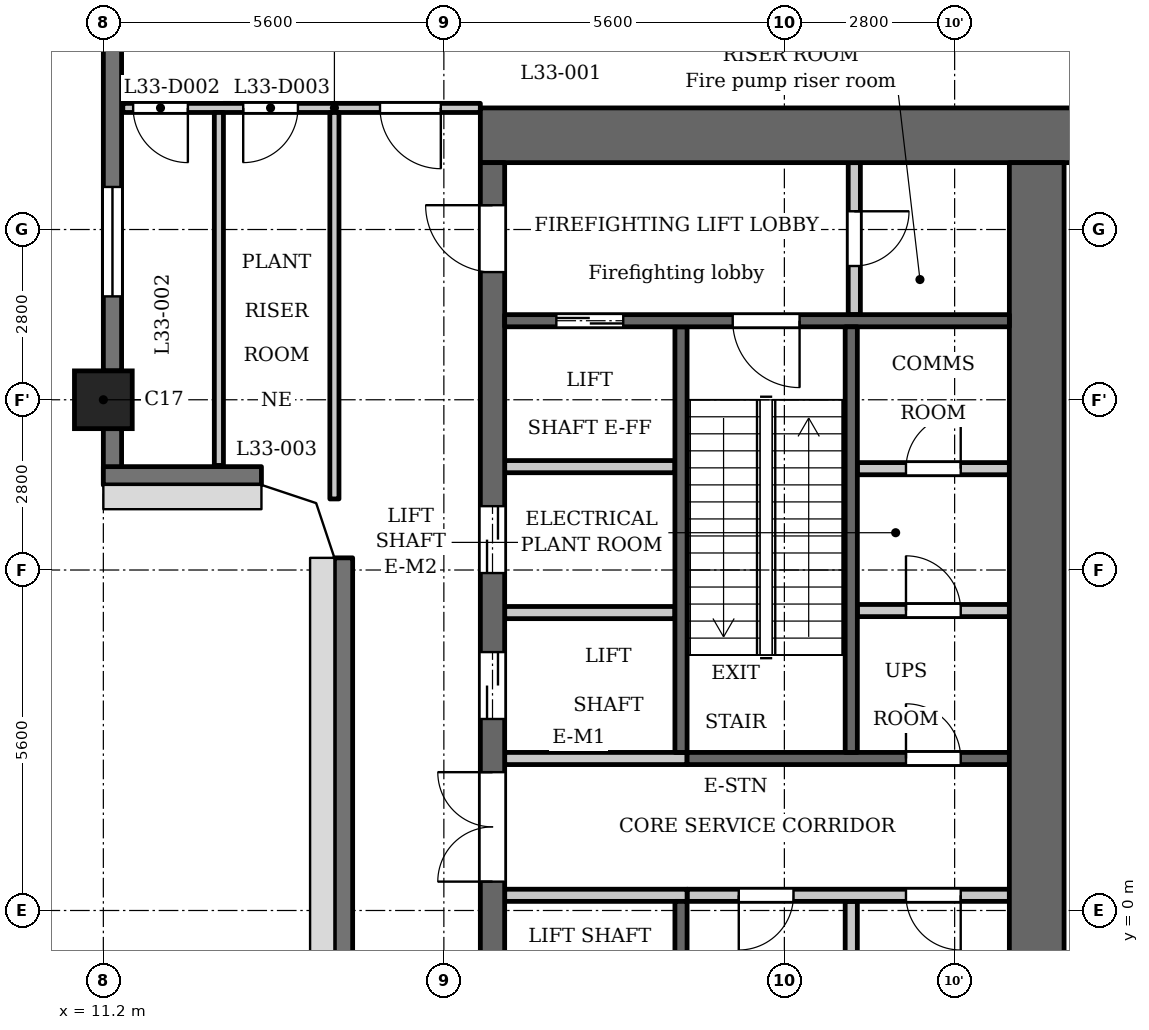
"""IFC4 building model, lengths in metres.
Left out: names, types, materials, properties, quantities, classifications, styles, units other than length and angle.
Written with IfcOpenShell. Run it as: python <this file> out.ifc"""

import sys

from ifc_helpers import new_model, si_unit, direction, frame, frame_2d, origin, origin_2d, place, context, subcontext, project, spatial, polyline, rectangle, outline, extrude, element, fill, save


model = new_model("IFC4")
c1 = context("Model", 3, precision=1e-05, world=origin(), true_north=direction((0.0, 1.0)))
c2 = subcontext(c1, "Body", "Model", "MODEL_VIEW")
j1 = project(units=[si_unit("LENGTHUNIT", "METRE"), si_unit("PLANEANGLEUNIT", "RADIAN")], contexts=[c1])
p1 = place(None, origin())
s1 = spatial("IfcSite", under=j1, at=p1, CompositionType="ELEMENT")
p2 = place(p1, origin())
s2 = spatial("IfcBuilding", under=s1, at=p2, CompositionType="ELEMENT")
p3 = place(p2, frame((0.0, 0.0, 130.7)))
s3 = spatial("IfcBuildingStorey", under=s2, at=p3, CompositionType="ELEMENT", Elevation=130.7)
p4 = place(p3, frame((11.2, 8.4, 0.0), z_axis=(0.0, 0.0, 1.0), x_axis=(1.0, 0.0, 0.0)))
e1 = element("IfcColumn", 1, at=p4, inside=s3, PredefinedType="COLUMN", context=c2, shape_type="SweptSolid", body=[
    extrude(rectangle(XDim=0.95, YDim=0.95, at=origin_2d()), origin(), (0.0, 0.0, 1.0), 5.4),
])
p5 = place(p3, frame((11.35, 14.975, 0.0), z_axis=(0.0, 0.0, 1.0), x_axis=(0.0, -1.0, 0.0)))
e2 = element("IfcWall", 2, at=p5, inside=s3, PredefinedType="SOLIDWALL", context=c2, shape_type="SweptSolid", body=[
    extrude(rectangle(XDim=6.1, YDim=0.3, at=frame_2d((3.05, 0.0))), origin(), (0.0, 0.0, 1.0), 5.1),
])
p6 = place(p5, frame((3.075, 0.0, 0.9)))
e3 = element("IfcOpeningElement", 3, at=p6, cuts=e2, PredefinedType="OPENING", context=c2, shape_type="SweptSolid", body=[
    extrude(rectangle(XDim=1.8, YDim=1.5, at=frame_2d((0.9, 0.75))), frame((0.0, 0.16, 0.0), z_axis=(0.0, -1.0, 0.0), x_axis=(1.0, 0.0, 0.0)), (0.0, 0.0, 1.0), 0.32),
])
p7 = place(p3, frame((11.35, 7.925, 0.0), z_axis=(0.0, 0.0, 1.0), x_axis=(0.0, -1.0, 0.0)))
e4 = element("IfcWall", 4, at=p7, inside=s3, PredefinedType="SOLIDWALL", context=c2, shape_type="SweptSolid", body=[
    extrude(rectangle(XDim=0.925, YDim=0.3, at=frame_2d((0.462, 0.0))), origin(), (0.0, 0.0, 1.0), 5.1),
])
p8 = place(p3, frame((11.2, 7.15, 0.0), z_axis=(0.0, 0.0, 1.0), x_axis=(1.0, 0.0, 0.0)))
e5 = element("IfcWall", 5, at=p8, inside=s3, PredefinedType="SOLIDWALL", context=c2, shape_type="SweptSolid", body=[
    extrude(rectangle(XDim=2.6, YDim=0.3, at=frame_2d((1.3, 0.0))), origin(), (0.0, 0.0, 1.0), 5.1),
])
p9 = place(p3, frame((15.15, 5.8, 0.0), z_axis=(0.0, 0.0, 1.0), x_axis=(0.0, -1.0, 0.0)))
e6 = element("IfcWall", 6, at=p9, inside=s3, PredefinedType="SOLIDWALL", context=c2, shape_type="SweptSolid", body=[
    extrude(rectangle(XDim=11.6, YDim=0.3, at=frame_2d((5.8, 0.0))), origin(), (0.0, 0.0, 1.0), 5.1),
])
p10 = place(p3, frame((23.5, -2.5, 0.0), z_axis=(0.0, 0.0, 1.0), x_axis=(0.0, 1.0, 0.0)))
e7 = element("IfcWall", 7, at=p10, inside=s3, PredefinedType="PARTITIONING", context=c2, shape_type="SweptSolid", body=[
    extrude(rectangle(XDim=2.65, YDim=0.2, at=frame_2d((1.325, 0.0))), origin(), (0.0, 0.0, 1.0), 5.1),
])
p11 = place(p3, frame((20.7, 2.6, 0.0), z_axis=(0.0, 0.0, 1.0), x_axis=(0.0, 1.0, 0.0)))
e8 = element("IfcWall", 8, at=p11, inside=s3, PredefinedType="SHEAR", context=c2, shape_type="SweptSolid", body=[
    extrude(rectangle(XDim=7.0, YDim=0.2, at=frame_2d((3.5, 0.0))), origin(), (0.0, 0.0, 1.0), 5.1),
])
p12 = place(p3, frame((20.7, -9.6, 0.0), z_axis=(0.0, 0.0, 1.0), x_axis=(0.0, 1.0, 0.0)))
e9 = element("IfcWall", 9, at=p12, inside=s3, PredefinedType="SHEAR", context=c2, shape_type="SweptSolid", body=[
    extrude(rectangle(XDim=9.75, YDim=0.2, at=frame_2d((4.875, 0.0))), origin(), (0.0, 0.0, 1.0), 5.1),
])
p13 = place(p3, frame((20.8, 2.5, 0.0), z_axis=(0.0, 0.0, 1.0), x_axis=(1.0, 0.0, 0.0)))
e10 = element("IfcWall", 10, at=p13, inside=s3, PredefinedType="SHEAR", context=c2, shape_type="SweptSolid", body=[
    extrude(rectangle(XDim=5.3, YDim=0.2, at=frame_2d((2.65, 0.0))), origin(), (0.0, 0.0, 1.0), 5.1),
])
p14 = place(p13, frame((3.6, 0.0, 0.0)))
e11 = element("IfcOpeningElement", 11, at=p14, cuts=e10, PredefinedType="OPENING", context=c2, shape_type="SweptSolid", body=[
    extrude(rectangle(XDim=0.9, YDim=2.1, at=frame_2d((0.45, 1.05))), frame((0.0, 0.11, 0.0), z_axis=(0.0, -1.0, 0.0), x_axis=(1.0, 0.0, 0.0)), (0.0, 0.0, 1.0), 0.22),
])
p15 = place(p3, frame((20.8, 0.25, 0.0), z_axis=(0.0, 0.0, 1.0), x_axis=(1.0, 0.0, 0.0)))
e12 = element("IfcWall", 12, at=p15, inside=s3, PredefinedType="PARTITIONING", context=c2, shape_type="SweptSolid", body=[
    extrude(rectangle(XDim=5.3, YDim=0.2, at=frame_2d((2.65, 0.0))), origin(), (0.0, 0.0, 1.0), 5.1),
])
p16 = place(p15, frame((0.85, 0.0, 0.0)))
e13 = element("IfcOpeningElement", 13, at=p16, cuts=e12, PredefinedType="OPENING", context=c2, shape_type="SweptSolid", body=[
    extrude(rectangle(XDim=0.9, YDim=2.1, at=frame_2d((0.45, 1.05))), frame((0.0, 0.11, 0.0), z_axis=(0.0, -1.0, 0.0), x_axis=(1.0, 0.0, 0.0)), (0.0, 0.0, 1.0), 0.22),
])
p17 = place(p15, frame((3.6, 0.0, 0.0)))
e14 = element("IfcOpeningElement", 14, at=p17, cuts=e12, PredefinedType="OPENING", context=c2, shape_type="SweptSolid", body=[
    extrude(rectangle(XDim=0.9, YDim=2.1, at=frame_2d((0.45, 1.05))), frame((0.0, 0.11, 0.0), z_axis=(0.0, -1.0, 0.0), x_axis=(1.0, 0.0, 0.0)), (0.0, 0.0, 1.0), 0.22),
])
p18 = place(p3, frame((17.4, 12.75, 0.0), z_axis=(0.0, 0.0, 1.0), x_axis=(1.0, 0.0, 0.0)))
e15 = element("IfcWall", 15, at=p18, inside=s3, PredefinedType="SHEAR", context=c2, shape_type="SweptSolid", body=[
    extrude(rectangle(XDim=10.4, YDim=0.9, at=frame_2d((5.2, 0.0))), origin(), (0.0, 0.0, 1.0), 5.1),
])
p19 = place(p3, frame((17.6, -12.3, 0.0), z_axis=(0.0, 0.0, 1.0), x_axis=(0.0, 1.0, 0.0)))
e16 = element("IfcWall", 16, at=p19, inside=s3, PredefinedType="SHEAR", context=c2, shape_type="SweptSolid", body=[
    extrude(rectangle(XDim=24.6, YDim=0.4, at=frame_2d((12.3, 0.0))), origin(), (0.0, 0.0, 1.0), 5.1),
])
p20 = place(p19, frame((15.45, 0.0, 0.0)))
e17 = element("IfcOpeningElement", 17, at=p20, cuts=e16, PredefinedType="OPENING", context=c2, shape_type="SweptSolid", body=[
    extrude(rectangle(XDim=1.1, YDim=2.1, at=frame_2d((0.55, 1.05))), frame((0.0, 0.21, 0.0), z_axis=(0.0, -1.0, 0.0), x_axis=(1.0, 0.0, 0.0)), (0.0, 0.0, 1.0), 0.42),
])
p21 = place(p19, frame((17.85, 0.0, 0.0)))
e18 = element("IfcOpeningElement", 18, at=p21, cuts=e16, PredefinedType="OPENING", context=c2, shape_type="SweptSolid", body=[
    extrude(rectangle(XDim=1.1, YDim=2.1, at=frame_2d((0.55, 1.05))), frame((0.0, 0.21, 0.0), z_axis=(0.0, -1.0, 0.0), x_axis=(1.0, 0.0, 0.0)), (0.0, 0.0, 1.0), 0.42),
])
p22 = place(p19, frame((22.8, 0.0, 0.0)))
e19 = element("IfcOpeningElement", 19, at=p22, cuts=e16, PredefinedType="OPENING", context=c2, shape_type="SweptSolid", body=[
    extrude(rectangle(XDim=1.1, YDim=2.1, at=frame_2d((0.55, 1.05))), frame((0.0, 0.21, 0.0), z_axis=(0.0, -1.0, 0.0), x_axis=(1.0, 0.0, 0.0)), (0.0, 0.0, 1.0), 0.42),
])
p23 = place(p19, frame((0.7, 0.0, 0.0)))
e20 = element("IfcOpeningElement", 20, at=p23, cuts=e16, PredefinedType="OPENING", context=c2, shape_type="SweptSolid", body=[
    extrude(rectangle(XDim=1.1, YDim=2.1, at=frame_2d((0.55, 1.05))), frame((0.0, 0.21, 0.0), z_axis=(0.0, -1.0, 0.0), x_axis=(1.0, 0.0, 0.0)), (0.0, 0.0, 1.0), 0.42),
])
p24 = place(p19, frame((12.775, 0.0, 0.0)))
e21 = element("IfcOpeningElement", 21, at=p24, cuts=e16, PredefinedType="OPENING", context=c2, shape_type="SweptSolid", body=[
    extrude(rectangle(XDim=1.8, YDim=2.1, at=frame_2d((0.9, 1.05))), frame((0.0, 0.21, 0.0), z_axis=(0.0, -1.0, 0.0), x_axis=(1.0, 0.0, 0.0)), (0.0, 0.0, 1.0), 0.42),
])
p25 = place(p3, frame((26.55, -12.3, 0.0), z_axis=(0.0, 0.0, 1.0), x_axis=(0.0, 1.0, 0.0)))
e22 = element("IfcWall", 22, at=p25, inside=s3, PredefinedType="SHEAR", context=c2, shape_type="SweptSolid", body=[
    extrude(rectangle(XDim=24.6, YDim=0.9, at=frame_2d((12.3, 0.0))), origin(), (0.0, 0.0, 1.0), 5.1),
])
p26 = place(p3, frame((23.55, 9.8, 0.0), z_axis=(0.0, 0.0, 1.0), x_axis=(0.0, 1.0, 0.0)))
e23 = element("IfcWall", 23, at=p26, inside=s3, PredefinedType="PARTITIONING", context=c2, shape_type="SweptSolid", body=[
    extrude(rectangle(XDim=2.5, YDim=0.2, at=frame_2d((1.25, 0.0))), origin(), (0.0, 0.0, 1.0), 5.1),
])
p27 = place(p26, frame((0.8, 0.0, 0.0)))
e24 = element("IfcOpeningElement", 24, at=p27, cuts=e23, PredefinedType="OPENING", context=c2, shape_type="SweptSolid", body=[
    extrude(rectangle(XDim=0.9, YDim=2.1, at=frame_2d((0.45, 1.05))), frame((0.0, 0.11, 0.0), z_axis=(0.0, -1.0, 0.0), x_axis=(1.0, 0.0, 0.0)), (0.0, 0.0, 1.0), 0.22),
])
p28 = place(p3, frame((23.6, 4.933, 0.0), z_axis=(0.0, 0.0, 1.0), x_axis=(1.0, 0.0, 0.0)))
e25 = element("IfcWall", 25, at=p28, inside=s3, PredefinedType="PARTITIONING", context=c2, shape_type="SweptSolid", body=[
    extrude(rectangle(XDim=2.5, YDim=0.2, at=frame_2d((1.25, 0.0))), origin(), (0.0, 0.0, 1.0), 5.1),
])
p29 = place(p28, frame((0.8, 0.0, 0.0)))
e26 = element("IfcOpeningElement", 26, at=p29, cuts=e25, PredefinedType="OPENING", context=c2, shape_type="SweptSolid", body=[
    extrude(rectangle(XDim=0.9, YDim=2.1, at=frame_2d((0.45, 1.05))), frame((0.0, 0.11, 0.0), z_axis=(0.0, -1.0, 0.0), x_axis=(1.0, 0.0, 0.0)), (0.0, 0.0, 1.0), 0.22),
])
p30 = place(p3, frame((23.6, 7.267, 0.0), z_axis=(0.0, 0.0, 1.0), x_axis=(1.0, 0.0, 0.0)))
e27 = element("IfcWall", 27, at=p30, inside=s3, PredefinedType="PARTITIONING", context=c2, shape_type="SweptSolid", body=[
    extrude(rectangle(XDim=2.5, YDim=0.2, at=frame_2d((1.25, 0.0))), origin(), (0.0, 0.0, 1.0), 5.1),
])
p31 = place(p30, frame((0.8, 0.0, 0.0)))
e28 = element("IfcOpeningElement", 28, at=p31, cuts=e27, PredefinedType="OPENING", context=c2, shape_type="SweptSolid", body=[
    extrude(rectangle(XDim=0.9, YDim=2.1, at=frame_2d((0.45, 1.05))), frame((0.0, 0.11, 0.0), z_axis=(0.0, -1.0, 0.0), x_axis=(1.0, 0.0, 0.0)), (0.0, 0.0, 1.0), 0.22),
])
for number, where, z_axis, x_axis in (
    (29, (17.8, 0.25, 0.0), (0.0, 0.0, 1.0), (1.0, 0.0, 0.0)),
    (30, (17.8, 2.5, 0.0), (0.0, 0.0, 1.0), (1.0, 0.0, 0.0)),
):
    element("IfcWall", number, at=place(p3, frame(where, z_axis=z_axis, x_axis=x_axis)), inside=s3, PredefinedType="PARTITIONING", context=c2, shape_type="SweptSolid", body=[
        extrude(rectangle(XDim=3.0, YDim=0.2, at=frame_2d((1.5, 0.0))), origin(), (0.0, 0.0, 1.0), 5.1),
    ])
for number, where, z_axis, x_axis in (
    (31, (17.8, 4.9, 0.0), (0.0, 0.0, 1.0), (1.0, 0.0, 0.0)),
    (32, (17.8, 7.3, 0.0), (0.0, 0.0, 1.0), (1.0, 0.0, 0.0)),
):
    element("IfcWall", number, at=place(p3, frame(where, z_axis=z_axis, x_axis=x_axis)), inside=s3, PredefinedType="PARTITIONING", context=c2, shape_type="SweptSolid", body=[
        extrude(rectangle(XDim=2.8, YDim=0.2, at=frame_2d((1.4, 0.0))), origin(), (0.0, 0.0, 1.0), 5.1),
    ])
p32 = place(p3, frame((17.8, 9.7, 0.0), z_axis=(0.0, 0.0, 1.0), x_axis=(1.0, 0.0, 0.0)))
e33 = element("IfcWall", 33, at=p32, inside=s3, PredefinedType="SHEAR", context=c2, shape_type="SweptSolid", body=[
    extrude(rectangle(XDim=8.3, YDim=0.2, at=frame_2d((4.15, 0.0))), origin(), (0.0, 0.0, 1.0), 5.1),
])
p33 = place(p32, frame((0.85, 0.0, 0.0)))
e34 = element("IfcOpeningElement", 34, at=p33, cuts=e33, PredefinedType="OPENING", context=c2, shape_type="SweptSolid", body=[
    extrude(rectangle(XDim=1.1, YDim=2.1, at=frame_2d((0.55, 1.05))), frame((0.0, 0.11, 0.0), z_axis=(0.0, -1.0, 0.0), x_axis=(1.0, 0.0, 0.0)), (0.0, 0.0, 1.0), 0.22),
])
p34 = place(p32, frame((3.75, 0.0, 0.0)))
e35 = element("IfcOpeningElement", 35, at=p34, cuts=e33, PredefinedType="OPENING", context=c2, shape_type="SweptSolid", body=[
    extrude(rectangle(XDim=1.1, YDim=2.1, at=frame_2d((0.55, 1.05))), frame((0.0, 0.11, 0.0), z_axis=(0.0, -1.0, 0.0), x_axis=(1.0, 0.0, 0.0)), (0.0, 0.0, 1.0), 0.22),
])
p35 = place(p3, frame((23.5, 2.6, 0.0), z_axis=(0.0, 0.0, 1.0), x_axis=(0.0, 1.0, 0.0)))
e36 = element("IfcWall", 36, at=p35, inside=s3, PredefinedType="SHEAR", context=c2, shape_type="SweptSolid", body=[
    extrude(rectangle(XDim=7.0, YDim=0.2, at=frame_2d((3.5, 0.0))), origin(), (0.0, 0.0, 1.0), 5.1),
])
p36 = place(p3, frame((11.52, 13.2, 0.0), z_axis=(0.0, 0.0, 1.0), x_axis=(1.0, 0.0, 0.0)))
e37 = element("IfcWall", 37, at=p36, inside=s3, PredefinedType="PARTITIONING", context=c2, shape_type="SweptSolid", body=[
    extrude(rectangle(XDim=5.88, YDim=0.15, at=frame_2d((2.94, 0.0))), origin(), (0.0, 0.0, 1.0), 5.1),
])
p37 = place(p36, frame((4.23, 0.0, 0.0)))
e38 = element("IfcOpeningElement", 38, at=p37, cuts=e37, PredefinedType="OPENING", context=c2, shape_type="SweptSolid", body=[
    extrude(rectangle(XDim=1.0, YDim=2.1, at=frame_2d((0.5, 1.05))), frame((0.0, 0.085, 0.0), z_axis=(0.0, -1.0, 0.0), x_axis=(1.0, 0.0, 0.0)), (0.0, 0.0, 1.0), 0.17),
])
p38 = place(p36, frame((0.17, 0.0, 0.0)))
e39 = element("IfcOpeningElement", 39, at=p38, cuts=e37, PredefinedType="OPENING", context=c2, shape_type="SweptSolid", body=[
    extrude(rectangle(XDim=0.9, YDim=2.1, at=frame_2d((0.45, 1.05))), frame((0.0, 0.085, 0.0), z_axis=(0.0, -1.0, 0.0), x_axis=(1.0, 0.0, 0.0)), (0.0, 0.0, 1.0), 0.17),
])
p39 = place(p36, frame((1.98, 0.0, 0.0)))
e40 = element("IfcOpeningElement", 40, at=p39, cuts=e37, PredefinedType="OPENING", context=c2, shape_type="SweptSolid", body=[
    extrude(rectangle(XDim=0.9, YDim=2.1, at=frame_2d((0.45, 1.05))), frame((0.0, 0.085, 0.0), z_axis=(0.0, -1.0, 0.0), x_axis=(1.0, 0.0, 0.0)), (0.0, 0.0, 1.0), 0.17),
])
p40 = place(p3, frame((13.1, 7.32, 0.0), z_axis=(0.0, 0.0, 1.0), x_axis=(0.0, 1.0, 0.0)))
e41 = element("IfcWall", 41, at=p40, inside=s3, PredefinedType="PARTITIONING", context=c2, shape_type="SweptSolid", body=[
    extrude(rectangle(XDim=5.805, YDim=0.15, at=frame_2d((2.902, 0.0))), origin(), (0.0, 0.0, 1.0), 5.1),
])
p41 = place(p3, frame((15.0, 6.769, 0.0), z_axis=(0.0, 0.0, 1.0), x_axis=(0.0, 1.0, 0.0)))
e42 = element("IfcWall", 42, at=p41, inside=s3, PredefinedType="PARTITIONING", context=c2, shape_type="SweptSolid", body=[
    extrude(rectangle(XDim=6.356, YDim=0.15, at=frame_2d((3.178, 0.0))), origin(), (0.0, 0.0, 1.0), 5.1),
])
p42 = place(p3, origin())
e43 = element("IfcWall", 43, at=p42, inside=s3, PredefinedType="SOLIDWALL", context=c2, shape_type="SweptSolid", body=[
    extrude(outline(polyline([(13.8, 7.0), (14.7, 6.7), (15.0, 5.8), (15.3, 5.8), (15.3, 5.849), (14.937, 6.937), (13.849, 7.3), (13.8, 7.3), (13.8, 7.0)])), origin(), (0.0, 0.0, 1.0), 5.1),
])
p43 = place(p20, origin())
e44 = element("IfcDoor", 44, at=p43, inside=s3, OperationType="DOUBLE_DOOR_SLIDING", PredefinedType="DOOR", context=c2, shape_type="SweptSolid", body=[
    extrude(rectangle(XDim=1.1, YDim=2.1, at=frame_2d((0.55, 1.05))), frame((0.0, 0.025, 0.0), z_axis=(0.0, -1.0, 0.0), x_axis=(1.0, 0.0, 0.0)), (0.0, 0.0, 1.0), 0.05),
])
fill(e17, e44)
p44 = place(p21, origin())
e45 = element("IfcDoor", 45, at=p44, inside=s3, OperationType="DOUBLE_DOOR_SLIDING", PredefinedType="DOOR", context=c2, shape_type="SweptSolid", body=[
    extrude(rectangle(XDim=1.1, YDim=2.1, at=frame_2d((0.55, 1.05))), frame((0.0, 0.025, 0.0), z_axis=(0.0, -1.0, 0.0), x_axis=(1.0, 0.0, 0.0)), (0.0, 0.0, 1.0), 0.05),
])
fill(e18, e45)
p45 = place(p33, origin())
e46 = element("IfcDoor", 46, at=p45, inside=s3, OperationType="DOUBLE_DOOR_SLIDING", PredefinedType="DOOR", context=c2, shape_type="SweptSolid", body=[
    extrude(rectangle(XDim=1.1, YDim=2.1, at=frame_2d((0.55, 1.05))), frame((0.0, 0.025, 0.0), z_axis=(0.0, -1.0, 0.0), x_axis=(1.0, 0.0, 0.0)), (0.0, 0.0, 1.0), 0.05),
])
fill(e34, e46)
p46 = place(p22, origin())
e47 = element("IfcDoor", 47, at=p46, inside=s3, OperationType="SINGLE_SWING_LEFT", PredefinedType="DOOR", context=c2, shape_type="SweptSolid", body=[
    extrude(rectangle(XDim=1.1, YDim=2.1, at=frame_2d((0.55, 1.05))), frame((0.0, 0.025, 0.0), z_axis=(0.0, -1.0, 0.0), x_axis=(1.0, 0.0, 0.0)), (0.0, 0.0, 1.0), 0.05),
])
fill(e19, e47)
p47 = place(p27, origin())
e48 = element("IfcDoor", 48, at=p47, inside=s3, OperationType="SINGLE_SWING_RIGHT", PredefinedType="DOOR", context=c2, shape_type="SweptSolid", body=[
    extrude(rectangle(XDim=0.9, YDim=2.1, at=frame_2d((0.45, 1.05))), frame((0.0, 0.025, 0.0), z_axis=(0.0, -1.0, 0.0), x_axis=(1.0, 0.0, 0.0)), (0.0, 0.0, 1.0), 0.05),
])
fill(e24, e48)
p48 = place(p34, origin())
e49 = element("IfcDoor", 49, at=p48, inside=s3, OperationType="SINGLE_SWING_RIGHT", PredefinedType="DOOR", context=c2, shape_type="SweptSolid", body=[
    extrude(rectangle(XDim=1.1, YDim=2.1, at=frame_2d((0.55, 1.05))), frame((0.0, 0.025, 0.0), z_axis=(0.0, -1.0, 0.0), x_axis=(1.0, 0.0, 0.0)), (0.0, 0.0, 1.0), 0.05),
])
fill(e35, e49)
p49 = place(p24, origin())
e50 = element("IfcDoor", 50, at=p49, inside=s3, OperationType="DOUBLE_DOOR_SINGLE_SWING", PredefinedType="DOOR", context=c2, shape_type="SweptSolid", body=[
    extrude(rectangle(XDim=1.8, YDim=2.1, at=frame_2d((0.9, 1.05))), frame((0.0, 0.025, 0.0), z_axis=(0.0, -1.0, 0.0), x_axis=(1.0, 0.0, 0.0)), (0.0, 0.0, 1.0), 0.05),
])
fill(e21, e50)
p50 = place(p16, origin())
e51 = element("IfcDoor", 51, at=p50, inside=s3, OperationType="SINGLE_SWING_LEFT", PredefinedType="DOOR", context=c2, shape_type="SweptSolid", body=[
    extrude(rectangle(XDim=0.9, YDim=2.1, at=frame_2d((0.45, 1.05))), frame((0.0, 0.025, 0.0), z_axis=(0.0, -1.0, 0.0), x_axis=(1.0, 0.0, 0.0)), (0.0, 0.0, 1.0), 0.05),
])
fill(e13, e51)
p51 = place(p17, origin())
e52 = element("IfcDoor", 52, at=p51, inside=s3, OperationType="SINGLE_SWING_RIGHT", PredefinedType="DOOR", context=c2, shape_type="SweptSolid", body=[
    extrude(rectangle(XDim=0.9, YDim=2.1, at=frame_2d((0.45, 1.05))), frame((0.0, 0.025, 0.0), z_axis=(0.0, -1.0, 0.0), x_axis=(1.0, 0.0, 0.0)), (0.0, 0.0, 1.0), 0.05),
])
fill(e14, e52)
p52 = place(p29, origin())
e53 = element("IfcDoor", 53, at=p52, inside=s3, OperationType="SINGLE_SWING_RIGHT", PredefinedType="DOOR", context=c2, shape_type="SweptSolid", body=[
    extrude(rectangle(XDim=0.9, YDim=2.1, at=frame_2d((0.45, 1.05))), frame((0.0, 0.025, 0.0), z_axis=(0.0, -1.0, 0.0), x_axis=(1.0, 0.0, 0.0)), (0.0, 0.0, 1.0), 0.05),
])
fill(e26, e53)
p53 = place(p31, origin())
e54 = element("IfcDoor", 54, at=p53, inside=s3, OperationType="SINGLE_SWING_LEFT", PredefinedType="DOOR", context=c2, shape_type="SweptSolid", body=[
    extrude(rectangle(XDim=0.9, YDim=2.1, at=frame_2d((0.45, 1.05))), frame((0.0, 0.025, 0.0), z_axis=(0.0, -1.0, 0.0), x_axis=(1.0, 0.0, 0.0)), (0.0, 0.0, 1.0), 0.05),
])
fill(e28, e54)
p54 = place(p14, origin())
e55 = element("IfcDoor", 55, at=p54, inside=s3, OperationType="SINGLE_SWING_RIGHT", PredefinedType="DOOR", context=c2, shape_type="SweptSolid", body=[
    extrude(rectangle(XDim=0.9, YDim=2.1, at=frame_2d((0.45, 1.05))), frame((0.0, 0.025, 0.0), z_axis=(0.0, -1.0, 0.0), x_axis=(1.0, 0.0, 0.0)), (0.0, 0.0, 1.0), 0.05),
])
fill(e11, e55)
p55 = place(p37, origin())
e56 = element("IfcDoor", 56, at=p55, inside=s3, OperationType="SINGLE_SWING_RIGHT", PredefinedType="DOOR", context=c2, shape_type="SweptSolid", body=[
    extrude(rectangle(XDim=1.0, YDim=2.1, at=frame_2d((0.5, 1.05))), frame((0.0, 0.025, 0.0), z_axis=(0.0, -1.0, 0.0), x_axis=(1.0, 0.0, 0.0)), (0.0, 0.0, 1.0), 0.05),
])
fill(e38, e56)
p56 = place(p38, origin())
e57 = element("IfcDoor", 57, at=p56, inside=s3, OperationType="SINGLE_SWING_RIGHT", PredefinedType="DOOR", context=c2, shape_type="SweptSolid", body=[
    extrude(rectangle(XDim=0.9, YDim=2.1, at=frame_2d((0.45, 1.05))), frame((0.0, 0.025, 0.0), z_axis=(0.0, -1.0, 0.0), x_axis=(1.0, 0.0, 0.0)), (0.0, 0.0, 1.0), 0.05),
])
fill(e39, e57)
p57 = place(p39, origin())
e58 = element("IfcDoor", 58, at=p57, inside=s3, OperationType="SINGLE_SWING_LEFT", PredefinedType="DOOR", context=c2, shape_type="SweptSolid", body=[
    extrude(rectangle(XDim=0.9, YDim=2.1, at=frame_2d((0.45, 1.05))), frame((0.0, 0.025, 0.0), z_axis=(0.0, -1.0, 0.0), x_axis=(1.0, 0.0, 0.0)), (0.0, 0.0, 1.0), 0.05),
])
fill(e40, e58)
p58 = place(p6, origin())
e59 = element("IfcWindow", 59, at=p58, inside=s3, PartitioningType="SINGLE_PANEL", PredefinedType="WINDOW", context=c2, shape_type="SweptSolid", body=[
    extrude(rectangle(XDim=1.8, YDim=1.5, at=frame_2d((0.9, 0.75))), frame((0.0, 0.03, 0.0), z_axis=(0.0, -1.0, 0.0), x_axis=(1.0, 0.0, 0.0)), (0.0, 0.0, 1.0), 0.06),
])
fill(e3, e59)
save(model, sys.argv[1])
